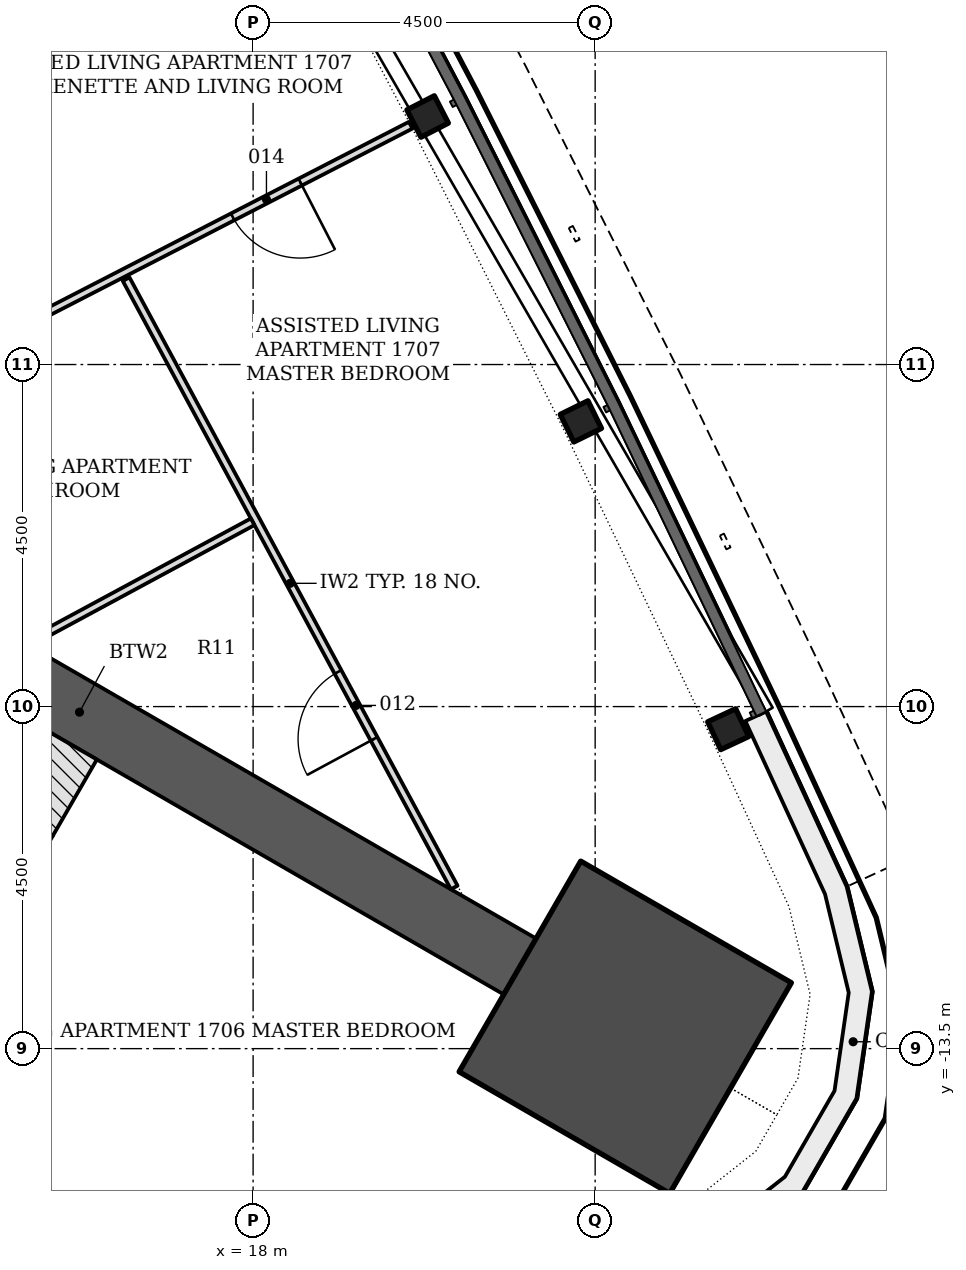
"""IFC4 building model, lengths in metres.
Left out: names, types, materials, properties, quantities, classifications, styles, units other than length and angle.
Written with IfcOpenShell. Run it as: python <this file> out.ifc"""

import sys

from ifc_helpers import new_model, si_unit, direction, frame, frame_2d, origin, origin_2d, place, context, subcontext, project, spatial, polyline, rectangle, i_section, outline, extrude, element, fill, save


model = new_model("IFC4")
c1 = context("Model", 3, precision=1e-05, world=origin(), true_north=direction((0.0, 1.0)))
c2 = subcontext(c1, "Body", "Model", "MODEL_VIEW")
j1 = project(units=[si_unit("LENGTHUNIT", "METRE"), si_unit("PLANEANGLEUNIT", "RADIAN")], contexts=[c1])
p1 = place(None, origin())
s1 = spatial("IfcSite", under=j1, at=p1, CompositionType="ELEMENT")
p2 = place(p1, origin())
s2 = spatial("IfcBuilding", under=s1, at=p2, CompositionType="ELEMENT")
p3 = place(p2, frame((0.0, 0.0, 69.0)))
s3 = spatial("IfcBuildingStorey", under=s2, at=p3, CompositionType="ELEMENT", Elevation=69.0)
p4 = place(p3, frame((9.922, -5.728, -0.2), z_axis=(0.0, 0.0, 1.0), x_axis=(0.866026077102, -0.499998833779, 0.0)))
e1 = element("IfcWall", 1, at=p4, inside=s3, PredefinedType="SHEAR", context=c2, shape_type="SweptSolid", body=[
    extrude(rectangle(XDim=13.381, YDim=0.85, at=frame_2d((6.691, 0.0))), origin(), (0.0, 0.0, 1.0), 3.6),
])
p5 = place(p3, frame((22.896, -13.219, -0.2), z_axis=(0.0, 0.0, 1.0), x_axis=(0.866025403784, -0.5, 0.0)))
e2 = element("IfcColumn", 2, at=p5, inside=s3, PredefinedType="COLUMN", context=c2, shape_type="SweptSolid", body=[
    extrude(rectangle(XDim=3.2, YDim=3.2, at=origin_2d()), origin(), (0.0, 0.0, 1.0), 3.6),
])
for number, where, z_axis, x_axis in (
    (3, (24.25, -9.297, -0.2), (0.0, 0.0, 1.0), (-0.423, 0.906, 0.0)),
    (4, (22.312, -5.248, -0.2), (0.0, 0.0, 1.0), (-0.44, 0.898, 0.0)),
    (5, (20.296, -1.237, -0.2), (0.0, 0.0, 1.0), (-0.458, 0.889, 0.0)),
):
    element("IfcColumn", number, at=place(p3, frame(where, z_axis=z_axis, x_axis=x_axis)), inside=s3, PredefinedType="COLUMN", context=c2, shape_type="SweptSolid", body=[
        extrude(i_section(OverallWidth=0.404, OverallDepth=0.406, WebThickness=0.027, FlangeThickness=0.044, FilletRadius=0.015, at=origin_2d()), origin(), (0.0, 0.0, 1.0), 3.6),
    ])
p6 = place(p3, origin())
e6 = element("IfcWall", 6, at=p6, inside=s3, PredefinedType="NOTDEFINED", context=c2, shape_type="SweptSolid", body=[
    extrude(outline(polyline([(20.225, -16.901), (22.75, -16.667), (24.112, -16.264), (25.228, -15.385), (25.938, -14.155), (26.141, -12.75), (25.809, -11.369), (24.749, -9.065), (24.476, -9.19), (25.524, -11.468), (25.836, -12.764), (25.649, -14.055), (24.997, -15.185), (23.972, -15.993), (22.693, -16.371), (20.197, -16.602), (20.225, -16.901)])), origin(), (0.0, 0.0, 1.0), 3.3),
])
p7 = place(p3, frame((9.419, -6.599, -0.2), z_axis=(0.0, 0.0, 1.0), x_axis=(0.866033125095, -0.499986626058, 0.0)))
e7 = element("IfcWall", 7, at=p7, inside=s3, PredefinedType="SHEAR", context=c2, shape_type="SweptSolid", body=[
    extrude(rectangle(XDim=7.2, YDim=1.161, at=frame_2d((3.6, 0.0))), origin(), (0.0, 0.0, 1.0), 3.6),
])
p8 = place(p3, frame((0.0, 0.0, -0.2)))
e8 = element("IfcWall", 8, at=p8, inside=s3, PredefinedType="SHEAR", context=c2, shape_type="SweptSolid", body=[
    extrude(outline(polyline([(12.104, -13.149), (14.289, -12.563), (15.364, -10.701), (15.191, -10.601), (14.157, -12.392), (12.132, -12.934), (12.204, -12.976), (12.204, -12.976), (12.204, -12.976), (12.204, -12.976), (12.204, -12.976), (12.204, -12.976), (12.204, -12.976), (12.204, -12.976), (12.204, -12.976), (12.204, -12.976), (12.204, -12.976), (12.204, -12.976), (12.204, -12.976), (12.204, -12.976), (12.204, -12.976), (12.204, -12.976), (12.204, -12.976), (12.104, -13.149)])), origin(), (0.0, 0.0, 1.0), 3.6),
])
p9 = place(p3, frame((17.983, 2.616, 0.0), z_axis=(0.0, 0.0, 1.0), x_axis=(-0.880118053528, -0.474754896608, 0.0)))
e9 = element("IfcWall", 9, at=p9, inside=s3, PredefinedType="PARTITIONING", context=c2, shape_type="SweptSolid", body=[
    extrude(rectangle(XDim=7.955, YDim=0.15, at=frame_2d((3.978, 0.0))), origin(), (0.0, 0.0, 1.0), 2.778),
])
p10 = place(p3, frame((20.646, -11.38, 0.0), z_axis=(0.0, 0.0, 1.0), x_axis=(-0.474727306664, 0.880132935588, 0.0)))
e10 = element("IfcWall", 10, at=p10, inside=s3, PredefinedType="PARTITIONING", context=c2, shape_type="SweptSolid", body=[
    extrude(rectangle(XDim=9.094, YDim=0.1, at=frame_2d((4.547, 0.0))), origin(), (0.0, 0.0, 1.0), 2.778),
])
p11 = place(p10, frame((2.222, 0.0, 0.0)))
e11 = element("IfcOpeningElement", 11, at=p11, cuts=e10, PredefinedType="OPENING", context=c2, shape_type="SweptSolid", body=[
    extrude(rectangle(XDim=1.0, YDim=2.1, at=frame_2d((0.5, 1.05))), frame((0.0, 0.06, 0.0), z_axis=(0.0, -1.0, 0.0), x_axis=(1.0, 0.0, 0.0)), (0.0, 0.0, 1.0), 0.12),
])
p12 = place(p3, frame((20.074, -1.351, 0.0), z_axis=(0.0, 0.0, 1.0), x_axis=(-0.88912315758, -0.457668013582, 0.0)))
e12 = element("IfcWall", 12, at=p12, inside=s3, PredefinedType="PARTITIONING", context=c2, shape_type="SweptSolid", body=[
    extrude(rectangle(XDim=8.429, YDim=0.1, at=frame_2d((4.214, 0.0))), origin(), (0.0, 0.0, 1.0), 2.778),
])
p13 = place(p12, frame((5.868, 0.0, 0.0)))
e13 = element("IfcOpeningElement", 13, at=p13, cuts=e12, PredefinedType="OPENING", context=c2, shape_type="SweptSolid", body=[
    extrude(rectangle(XDim=1.0, YDim=2.1, at=frame_2d((0.5, 1.05))), frame((0.0, 0.06, 0.0), z_axis=(0.0, -1.0, 0.0), x_axis=(1.0, 0.0, 0.0)), (0.0, 0.0, 1.0), 0.12),
])
p14 = place(p12, frame((1.635, 0.0, 0.0)))
e14 = element("IfcOpeningElement", 14, at=p14, cuts=e12, PredefinedType="OPENING", context=c2, shape_type="SweptSolid", body=[
    extrude(rectangle(XDim=1.0, YDim=2.1, at=frame_2d((0.5, 1.05))), frame((0.0, 0.06, 0.0), z_axis=(0.0, -1.0, 0.0), x_axis=(1.0, 0.0, 0.0)), (0.0, 0.0, 1.0), 0.12),
])
p15 = place(p3, frame((17.994, -6.569, 0.0), z_axis=(0.0, 0.0, 1.0), x_axis=(-0.880148573472, -0.474698313263, 0.0)))
e15 = element("IfcWall", 15, at=p15, inside=s3, PredefinedType="PARTITIONING", context=c2, shape_type="SweptSolid", body=[
    extrude(rectangle(XDim=3.356, YDim=0.1, at=frame_2d((1.678, 0.0))), origin(), (0.0, 0.0, 1.0), 3.4),
])
p16 = place(p11, origin())
e16 = element("IfcDoor", 16, at=p16, inside=s3, OperationType="SINGLE_SWING_LEFT", PredefinedType="DOOR", context=c2, shape_type="SweptSolid", body=[
    extrude(rectangle(XDim=1.0, YDim=2.1, at=frame_2d((0.5, 1.05))), frame((0.0, 0.025, 0.0), z_axis=(0.0, -1.0, 0.0), x_axis=(1.0, 0.0, 0.0)), (0.0, 0.0, 1.0), 0.05),
])
fill(e11, e16)
p17 = place(p14, origin())
e17 = element("IfcDoor", 17, at=p17, inside=s3, OperationType="SINGLE_SWING_LEFT", PredefinedType="DOOR", context=c2, shape_type="SweptSolid", body=[
    extrude(rectangle(XDim=1.0, YDim=2.1, at=frame_2d((0.5, 1.05))), frame((0.0, 0.025, 0.0), z_axis=(0.0, -1.0, 0.0), x_axis=(1.0, 0.0, 0.0)), (0.0, 0.0, 1.0), 0.05),
])
fill(e14, e17)
save(model, sys.argv[1])
